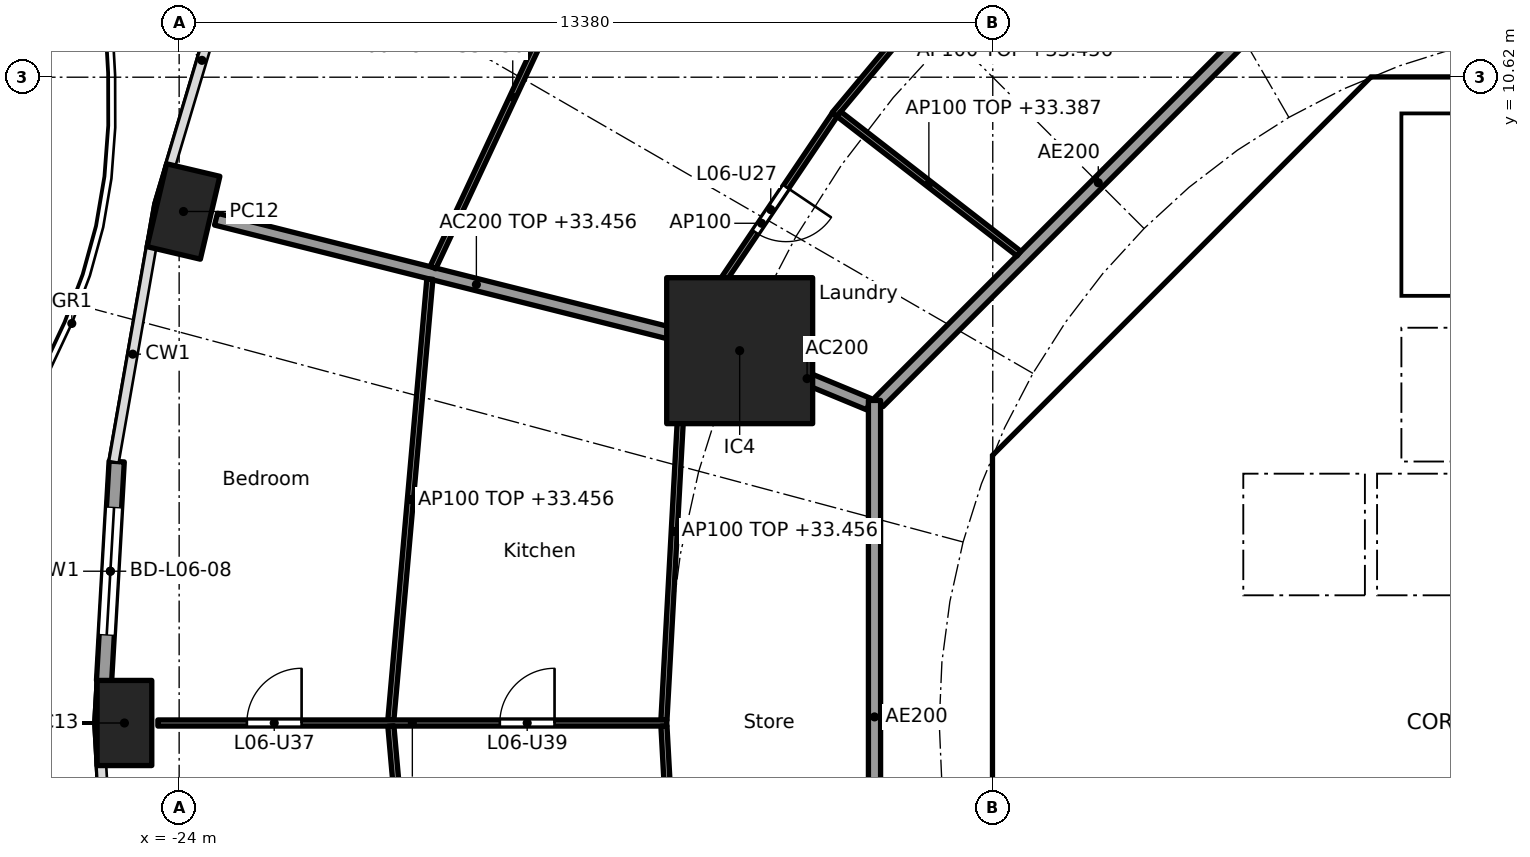
"""IFC4 building model, lengths in metres.
Left out: names, types, materials, properties, quantities, classifications, styles, units other than length and angle.
Written with IfcOpenShell. Run it as: python <this file> out.ifc"""

import sys

from ifc_helpers import new_model, si_unit, direction, frame, frame_2d, origin, origin_2d, place, context, subcontext, project, spatial, polyline, rectangle, hollow_rectangle, outline, extrude, element, fill, save


model = new_model("IFC4")
c1 = context("Model", 3, precision=1e-05, world=origin(), true_north=direction((0.0, 1.0)))
c2 = subcontext(c1, "Body", "Model", "MODEL_VIEW")
j1 = project(units=[si_unit("LENGTHUNIT", "METRE"), si_unit("PLANEANGLEUNIT", "RADIAN")], contexts=[c1])
p1 = place(None, origin())
s1 = spatial("IfcSite", under=j1, at=p1, CompositionType="ELEMENT")
p2 = place(p1, origin())
s2 = spatial("IfcBuilding", under=s1, at=p2, CompositionType="ELEMENT")
p3 = place(p2, frame((0.0, 0.0, 30.7)))
s3 = spatial("IfcBuildingStorey", under=s2, at=p3, CompositionType="ELEMENT", Elevation=30.7)
for number, where, z_axis, x_axis in (
    (1, (-23.929, 8.412, 0.0), (0.0, 0.0, 1.0), (-0.229, -0.973, 0.0)),
    (2, (-24.9, 0.0, 0.0), (0.0, 0.0, 1.0), (0.0, -1.0, 0.0)),
):
    element("IfcColumn", number, at=place(p3, frame(where, z_axis=z_axis, x_axis=x_axis)), inside=s3, PredefinedType="COLUMN", context=c2, shape_type="SweptSolid", body=[
        extrude(hollow_rectangle(XDim=1.4, YDim=0.9, WallThickness=0.05, at=origin_2d()), origin(), (0.0, 0.0, 1.0), 3.7),
    ])
p4 = place(p3, frame((-14.782, 6.123, 0.0), z_axis=(0.0, 0.0, 1.0), x_axis=(1.0, 0.0, 0.0)))
e3 = element("IfcColumn", 3, at=p4, inside=s3, PredefinedType="COLUMN", context=c2, shape_type="SweptSolid", body=[
    extrude(rectangle(XDim=2.4, YDim=2.4, at=origin_2d()), origin(), (0.0, 0.0, 1.0), 3.7),
])
p5 = place(p3, frame((-25.235, 0.692, 0.0), z_axis=(0.0, 0.0, 1.0), x_axis=(0.057478727308, 0.998346731305, 0.0)))
e4 = element("IfcWall", 4, at=p5, inside=s3, PredefinedType="SOLIDWALL", context=c2, shape_type="SweptSolid", body=[
    extrude(rectangle(XDim=3.615, YDim=0.25, at=frame_2d((1.807, 0.0))), origin(), (0.0, 0.0, 1.0), 3.44),
])
p6 = place(p5, frame((0.757, 0.0, 0.0)))
e5 = element("IfcOpeningElement", 5, at=p6, cuts=e4, PredefinedType="OPENING", context=c2, shape_type="SweptSolid", body=[
    extrude(rectangle(XDim=2.1, YDim=2.4, at=frame_2d((1.05, 1.2))), frame((0.0, 0.135, 0.0), z_axis=(0.0, -1.0, 0.0), x_axis=(1.0, 0.0, 0.0)), (0.0, 0.0, 1.0), 0.27),
])
p7 = place(p3, frame((-4.613, 9.988, 0.0), z_axis=(0.0, 0.0, 1.0), x_axis=(-0.707106781187, -0.707106781187, 0.0)))
e6 = element("IfcWall", 6, at=p7, inside=s3, PredefinedType="SHEAR", context=c2, shape_type="SweptSolid", body=[
    extrude(rectangle(XDim=7.602, YDim=0.6, at=frame_2d((3.801, 0.0))), origin(), (0.0, 0.0, 1.0), 3.44),
])
p8 = place(p7, frame((0.351, 0.0, 0.0)))
e7 = element("IfcOpeningElement", 7, at=p8, cuts=e6, PredefinedType="OPENING", context=c2, shape_type="SweptSolid", body=[
    extrude(rectangle(XDim=1.1, YDim=2.1, at=frame_2d((0.55, 1.05))), frame((0.0, 0.31, 0.0), z_axis=(0.0, -1.0, 0.0), x_axis=(1.0, 0.0, 0.0)), (0.0, 0.0, 1.0), 0.62),
])
p9 = place(p3, frame((-10.325, 3.801, 0.0), z_axis=(0.0, 0.0, 1.0), x_axis=(0.0, -1.0, 0.0)))
e8 = element("IfcWall", 8, at=p9, inside=s3, PredefinedType="SHEAR", context=c2, shape_type="SweptSolid", body=[
    extrude(rectangle(XDim=7.602, YDim=0.6, at=frame_2d((3.801, 0.0))), origin(), (0.0, 0.0, 1.0), 3.44),
])
p10 = place(p9, frame((0.651, 0.0, 0.0)))
e9 = element("IfcOpeningElement", 9, at=p10, cuts=e8, PredefinedType="OPENING", context=c2, shape_type="SweptSolid", body=[
    extrude(rectangle(XDim=1.5, YDim=2.1, at=frame_2d((0.75, 1.05))), frame((0.0, 0.31, 0.0), z_axis=(0.0, -1.0, 0.0), x_axis=(1.0, 0.0, 0.0)), (0.0, 0.0, 1.0), 0.62),
])
p11 = place(p9, frame((5.451, 0.0, 0.0)))
e10 = element("IfcOpeningElement", 10, at=p11, cuts=e8, PredefinedType="OPENING", context=c2, shape_type="SweptSolid", body=[
    extrude(rectangle(XDim=1.5, YDim=2.1, at=frame_2d((0.75, 1.05))), frame((0.0, 0.31, 0.0), z_axis=(0.0, -1.0, 0.0), x_axis=(1.0, 0.0, 0.0)), (0.0, 0.0, 1.0), 0.62),
])
p12 = place(p3, frame((-5.8, 4.3, 0.0), z_axis=(0.0, 0.0, 1.0), x_axis=(0.0, 1.0, 0.0)))
e11 = element("IfcWall", 11, at=p12, inside=s3, PredefinedType="PARTITIONING", context=c2, shape_type="SweptSolid", body=[
    extrude(rectangle(XDim=3.927, YDim=0.15, at=frame_2d((1.963, 0.0))), origin(), (0.0, 0.0, 1.0), 3.44),
])
p13 = place(p12, frame((0.413, 0.0, 0.0)))
e12 = element("IfcOpeningElement", 12, at=p13, cuts=e11, PredefinedType="OPENING", context=c2, shape_type="SweptSolid", body=[
    extrude(rectangle(XDim=0.9, YDim=2.1, at=frame_2d((0.45, 1.05))), frame((0.0, 0.085, 0.0), z_axis=(0.0, -1.0, 0.0), x_axis=(1.0, 0.0, 0.0)), (0.0, 0.0, 1.0), 0.17),
])
p14 = place(p12, frame((2.489, 0.0, 0.0)))
e13 = element("IfcOpeningElement", 13, at=p14, cuts=e11, PredefinedType="OPENING", context=c2, shape_type="SweptSolid", body=[
    extrude(rectangle(XDim=0.9, YDim=2.1, at=frame_2d((0.45, 1.05))), frame((0.0, 0.085, 0.0), z_axis=(0.0, -1.0, 0.0), x_axis=(1.0, 0.0, 0.0)), (0.0, 0.0, 1.0), 0.17),
])
p15 = place(p3, frame((-4.0, 4.3, 0.0), z_axis=(0.0, 0.0, 1.0), x_axis=(0.0, 1.0, 0.0)))
e14 = element("IfcWall", 14, at=p15, inside=s3, PredefinedType="SOLIDWALL", context=c2, shape_type="SweptSolid", body=[
    extrude(rectangle(XDim=2.2, YDim=0.2, at=frame_2d((1.1, 0.0))), origin(), (0.0, 0.0, 1.0), 3.44),
])
p16 = place(p15, frame((0.55, 0.0, 0.0)))
e15 = element("IfcOpeningElement", 15, at=p16, cuts=e14, PredefinedType="OPENING", context=c2, shape_type="SweptSolid", body=[
    extrude(rectangle(XDim=1.1, YDim=2.1, at=frame_2d((0.55, 1.05))), frame((0.0, 0.11, 0.0), z_axis=(0.0, -1.0, 0.0), x_axis=(1.0, 0.0, 0.0)), (0.0, 0.0, 1.0), 0.22),
])
p17 = place(p3, frame((-6.7, 2.0, 0.0), z_axis=(0.0, 0.0, 1.0), x_axis=(1.0, 0.0, 0.0)))
e16 = element("IfcWall", 16, at=p17, inside=s3, PredefinedType="SOLIDWALL", context=c2, shape_type="SweptSolid", body=[
    extrude(rectangle(XDim=13.4, YDim=0.2, at=frame_2d((6.7, 0.0))), origin(), (0.0, 0.0, 1.0), 3.44),
])
p18 = place(p17, frame((0.65, 0.0, 0.0)))
e17 = element("IfcOpeningElement", 17, at=p18, cuts=e16, PredefinedType="OPENING", context=c2, shape_type="SweptSolid", body=[
    extrude(rectangle(XDim=1.1, YDim=2.1, at=frame_2d((0.55, 1.05))), frame((0.0, 0.11, 0.0), z_axis=(0.0, -1.0, 0.0), x_axis=(1.0, 0.0, 0.0)), (0.0, 0.0, 1.0), 0.22),
])
p19 = place(p17, frame((2.85, 0.0, 0.0)))
e18 = element("IfcOpeningElement", 18, at=p19, cuts=e16, PredefinedType="OPENING", context=c2, shape_type="SweptSolid", body=[
    extrude(rectangle(XDim=1.1, YDim=2.1, at=frame_2d((0.55, 1.05))), frame((0.0, 0.11, 0.0), z_axis=(0.0, -1.0, 0.0), x_axis=(1.0, 0.0, 0.0)), (0.0, 0.0, 1.0), 0.22),
])
p20 = place(p17, frame((5.05, 0.0, 0.0)))
e19 = element("IfcOpeningElement", 19, at=p20, cuts=e16, PredefinedType="OPENING", context=c2, shape_type="SweptSolid", body=[
    extrude(rectangle(XDim=1.1, YDim=2.1, at=frame_2d((0.55, 1.05))), frame((0.0, 0.11, 0.0), z_axis=(0.0, -1.0, 0.0), x_axis=(1.0, 0.0, 0.0)), (0.0, 0.0, 1.0), 0.22),
])
p21 = place(p3, origin())
e20 = element("IfcWall", 20, at=p21, inside=s3, PredefinedType="SHEAR", context=c2, shape_type="SweptSolid", body=[
    extrude(outline(polyline([(-10.2, 4.825), (-9.776, 4.401), (-10.025, 4.152), (-10.025, 3.801), (-10.625, 3.801), (-10.625, 4.401), (-10.2, 4.825)])), origin(), (0.0, 0.0, 1.0), 3.44),
])
p22 = place(p3, origin())
e21 = element("IfcWall", 21, at=p22, inside=s3, PredefinedType="SHEAR", context=c2, shape_type="SweptSolid", body=[
    extrude(outline(polyline([(-4.152, 10.025), (-4.401, 9.776), (-4.825, 10.2), (-4.401, 10.625), (4.401, 10.625), (4.825, 10.2), (4.401, 9.776), (4.152, 10.025), (-4.152, 10.025)])), origin(), (0.0, 0.0, 1.0), 3.44),
])
p23 = place(p3, frame((-10.025, 4.0, 0.0), z_axis=(0.0, 0.0, 1.0), x_axis=(1.0, 0.0, 0.0)))
e22 = element("IfcWall", 22, at=p23, inside=s3, PredefinedType="PARTITIONING", context=c2, shape_type="SweptSolid", body=[
    extrude(rectangle(XDim=3.325, YDim=0.2, at=frame_2d((1.662, 0.0))), origin(), (0.0, 0.0, 1.0), 3.44),
])
p24 = place(p3, frame((-8.001, 6.1, 0.0), z_axis=(0.0, 0.0, 1.0), x_axis=(1.0, 0.0, 0.0)))
e23 = element("IfcWall", 23, at=p24, inside=s3, PredefinedType="PARTITIONING", context=c2, shape_type="SweptSolid", body=[
    extrude(rectangle(XDim=2.126, YDim=0.15, at=frame_2d((1.063, 0.0))), origin(), (0.0, 0.0, 1.0), 3.44),
])
p25 = place(p3, origin())
e24 = element("IfcWall", 24, at=p25, inside=s3, PredefinedType="SOLIDWALL", context=c2, shape_type="SweptSolid", body=[
    extrude(outline(polyline([(-6.5, 2.1), (-6.7, 2.1), (-6.7, 4.3), (6.7, 4.3), (6.7, 2.1), (6.5, 2.1), (6.5, 4.1), (4.5, 4.1), (4.5, 2.1), (4.3, 2.1), (4.3, 4.1), (2.3, 4.1), (2.3, 2.1), (2.1, 2.1), (2.1, 4.1), (0.1, 4.1), (0.1, 2.1), (-0.1, 2.1), (-0.1, 4.1), (-2.1, 4.1), (-2.1, 2.1), (-2.3, 2.1), (-2.3, 4.1), (-4.3, 4.1), (-4.3, 2.1), (-4.5, 2.1), (-4.5, 4.1), (-6.5, 4.1), (-6.5, 2.1)])), origin(), (0.0, 0.0, 1.0), 3.44),
])
p26 = place(p3, origin())
e25 = element("IfcWall", 25, at=p26, inside=s3, PredefinedType="SOLIDWALL", context=c2, shape_type="SweptSolid", body=[
    extrude(outline(polyline([(-3.9, 7.025), (-4.1, 7.025), (-4.1, 10.025), (-3.9, 10.025), (-3.9, 7.025)])), origin(), (0.0, 0.0, 1.0), 3.44),
])
p27 = place(p3, origin())
e26 = element("IfcWall", 26, at=p27, inside=s3, PredefinedType="SOLIDWALL", context=c2, shape_type="SweptSolid", body=[
    extrude(outline(polyline([(4.1, 6.5), (-4.1, 6.5), (-4.1, 7.025), (4.1, 7.025), (4.1, 6.5)])), origin(), (0.0, 0.0, 1.0), 3.44),
])
p28 = place(p3, frame((-12.657, 5.243, 0.0), z_axis=(0.0, 0.0, 1.0), x_axis=(-0.923885664896, 0.382668627144, 0.0)))
e27 = element("IfcWall", 27, at=p28, inside=s3, PredefinedType="PARTITIONING", context=c2, shape_type="SweptSolid", body=[
    extrude(rectangle(XDim=2.2, YDim=0.2, at=frame_2d((1.1, 0.0))), origin(), (0.0, 0.0, 1.0), 3.44),
])
p29 = place(p3, frame((-14.831, 6.135, 0.0), z_axis=(0.0, 0.0, 1.0), x_axis=(-0.969884949569, 0.243563512454, 0.0)))
e28 = element("IfcWall", 28, at=p29, inside=s3, PredefinedType="PARTITIONING", context=c2, shape_type="SweptSolid", body=[
    extrude(rectangle(XDim=8.829, YDim=0.2, at=frame_2d((4.415, 0.0))), origin(), (0.0, 0.0, 1.0), 2.756),
])
p30 = place(p3, frame((-5.275, 12.494, 0.0), z_axis=(0.0, 0.0, 1.0), x_axis=(-0.707106781187, -0.707106781187, 0.0)))
e29 = element("IfcWall", 29, at=p30, inside=s3, PredefinedType="PARTITIONING", context=c2, shape_type="SweptSolid", body=[
    extrude(rectangle(XDim=10.209, YDim=0.2, at=frame_2d((5.104, 0.0))), origin(), (0.0, 0.0, 1.0), 3.44),
])
p31 = place(p3, frame((-12.565, 5.304, 0.0), z_axis=(0.0, 0.0, 1.0), x_axis=(0.0, -1.0, 0.0)))
e30 = element("IfcWall", 30, at=p31, inside=s3, PredefinedType="PARTITIONING", context=c2, shape_type="SweptSolid", body=[
    extrude(rectangle(XDim=10.409, YDim=0.2, at=frame_2d((5.205, 0.0))), origin(), (0.0, 0.0, 1.0), 3.44),
])
p32 = place(p3, frame((-10.123, 13.72, 0.0), z_axis=(0.0, 0.0, 1.0), x_axis=(-0.64083455704, -0.767679015282, 0.0)))
e31 = element("IfcWall", 31, at=p32, inside=s3, PredefinedType="PARTITIONING", context=c2, shape_type="SweptSolid", body=[
    extrude(rectangle(XDim=4.837, YDim=0.1, at=frame_2d((2.418, 0.0))), origin(), (0.0, 0.0, 1.0), 2.756),
])
p33 = place(p3, frame((-10.19, 7.719, 0.0), z_axis=(0.0, 0.0, 1.0), x_axis=(-0.790253294643, 0.612780327937, 0.0)))
e32 = element("IfcWall", 32, at=p33, inside=s3, PredefinedType="PARTITIONING", context=c2, shape_type="SweptSolid", body=[
    extrude(rectangle(XDim=3.746, YDim=0.1, at=frame_2d((1.873, 0.0))), origin(), (0.0, 0.0, 1.0), 2.687),
])
p34 = place(p3, frame((-13.218, 10.004, 0.0), z_axis=(0.0, 0.0, 1.0), x_axis=(-0.559112679527, -0.829091678641, 0.0)))
e33 = element("IfcWall", 33, at=p34, inside=s3, PredefinedType="PARTITIONING", context=c2, shape_type="SweptSolid", body=[
    extrude(rectangle(XDim=4.308, YDim=0.1, at=frame_2d((2.154, 0.0))), origin(), (0.0, 0.0, 1.0), 3.44),
])
p35 = place(p34, frame((1.433, 0.0, 0.0)))
e34 = element("IfcOpeningElement", 34, at=p35, cuts=e33, PredefinedType="OPENING", context=c2, shape_type="SweptSolid", body=[
    extrude(rectangle(XDim=0.9, YDim=2.1, at=frame_2d((0.45, 1.05))), frame((0.0, 0.06, 0.0), z_axis=(0.0, -1.0, 0.0), x_axis=(1.0, 0.0, 0.0)), (0.0, 0.0, 1.0), 0.12),
])
p36 = place(p3, frame((-17.203, 13.095, 0.0), z_axis=(0.0, 0.0, 1.0), x_axis=(-0.423926333401, -0.905696673202, 0.0)))
e35 = element("IfcWall", 35, at=p36, inside=s3, PredefinedType="PARTITIONING", context=c2, shape_type="SweptSolid", body=[
    extrude(rectangle(XDim=6.188, YDim=0.1, at=frame_2d((3.094, 0.0))), origin(), (0.0, 0.0, 1.0), 2.756),
])
p37 = place(p3, frame((-15.688, 6.249, 0.0), z_axis=(0.0, 0.0, 1.0), x_axis=(-0.054659814056, -0.998505034903, 0.0)))
e36 = element("IfcWall", 36, at=p37, inside=s3, PredefinedType="PARTITIONING", context=c2, shape_type="SweptSolid", body=[
    extrude(rectangle(XDim=6.208, YDim=0.1, at=frame_2d((3.104, 0.0))), origin(), (0.0, 0.0, 1.0), 2.756),
])
p38 = place(p3, frame((-19.877, 7.301, 0.0), z_axis=(0.0, 0.0, 1.0), x_axis=(-0.088143415068, -0.996107794558, 0.0)))
e37 = element("IfcWall", 37, at=p38, inside=s3, PredefinedType="PARTITIONING", context=c2, shape_type="SweptSolid", body=[
    extrude(rectangle(XDim=7.279, YDim=0.1, at=frame_2d((3.64, 0.0))), origin(), (0.0, 0.0, 1.0), 2.756),
])
p39 = place(p3, frame((-15.98, 0.0, 0.0), z_axis=(0.0, 0.0, 1.0), x_axis=(-1.0, 0.0, 0.0)))
e38 = element("IfcWall", 38, at=p39, inside=s3, PredefinedType="PARTITIONING", context=c2, shape_type="SweptSolid", body=[
    extrude(rectangle(XDim=8.37, YDim=0.1, at=frame_2d((4.185, 0.0))), origin(), (0.0, 0.0, 1.0), 2.756),
])
p40 = place(p39, frame((6.006, 0.0, 0.0)))
e39 = element("IfcOpeningElement", 39, at=p40, cuts=e38, PredefinedType="OPENING", context=c2, shape_type="SweptSolid", body=[
    extrude(rectangle(XDim=0.9, YDim=2.1, at=frame_2d((0.45, 1.05))), frame((0.0, 0.06, 0.0), z_axis=(0.0, -1.0, 0.0), x_axis=(1.0, 0.0, 0.0)), (0.0, 0.0, 1.0), 0.12),
])
p41 = place(p39, frame((1.846, 0.0, 0.0)))
e40 = element("IfcOpeningElement", 40, at=p41, cuts=e38, PredefinedType="OPENING", context=c2, shape_type="SweptSolid", body=[
    extrude(rectangle(XDim=0.9, YDim=2.1, at=frame_2d((0.45, 1.05))), frame((0.0, 0.06, 0.0), z_axis=(0.0, -1.0, 0.0), x_axis=(1.0, 0.0, 0.0)), (0.0, 0.0, 1.0), 0.12),
])
p42 = place(p3, frame((-16.028, -0.05, 0.0), z_axis=(0.0, 0.0, 1.0), x_axis=(0.054636410342, -0.998506315786, 0.0)))
e41 = element("IfcWall", 41, at=p42, inside=s3, PredefinedType="PARTITIONING", context=c2, shape_type="SweptSolid", body=[
    extrude(rectangle(XDim=6.359, YDim=0.1, at=frame_2d((3.179, 0.0))), origin(), (0.0, 0.0, 1.0), 2.756),
])
p43 = place(p42, frame((2.704, 0.0, 0.0)))
e42 = element("IfcOpeningElement", 42, at=p43, cuts=e41, PredefinedType="OPENING", context=c2, shape_type="SweptSolid", body=[
    extrude(rectangle(XDim=0.9, YDim=2.1, at=frame_2d((0.45, 1.05))), frame((0.0, 0.06, 0.0), z_axis=(0.0, -1.0, 0.0), x_axis=(1.0, 0.0, 0.0)), (0.0, 0.0, 1.0), 0.12),
])
p44 = place(p3, frame((-20.518, -0.05, 0.0), z_axis=(0.0, 0.0, 1.0), x_axis=(0.088138375539, -0.996108240483, 0.0)))
e43 = element("IfcWall", 43, at=p44, inside=s3, PredefinedType="PARTITIONING", context=c2, shape_type="SweptSolid", body=[
    extrude(rectangle(XDim=7.429, YDim=0.1, at=frame_2d((3.714, 0.0))), origin(), (0.0, 0.0, 1.0), 2.756),
])
p45 = place(p44, frame((3.24, 0.0, 0.0)))
e44 = element("IfcOpeningElement", 44, at=p45, cuts=e43, PredefinedType="OPENING", context=c2, shape_type="SweptSolid", body=[
    extrude(rectangle(XDim=0.9, YDim=2.1, at=frame_2d((0.45, 1.05))), frame((0.0, 0.06, 0.0), z_axis=(0.0, -1.0, 0.0), x_axis=(1.0, 0.0, 0.0)), (0.0, 0.0, 1.0), 0.12),
])
p46 = place(p6, origin())
e45 = element("IfcDoor", 45, at=p46, inside=s3, OperationType="SLIDING_TO_LEFT", PredefinedType="DOOR", context=c2, shape_type="SweptSolid", body=[
    extrude(rectangle(XDim=2.1, YDim=2.4, at=frame_2d((1.05, 1.2))), frame((0.0, 0.025, 0.0), z_axis=(0.0, -1.0, 0.0), x_axis=(1.0, 0.0, 0.0)), (0.0, 0.0, 1.0), 0.05),
])
fill(e5, e45)
p47 = place(p18, origin())
e46 = element("IfcDoor", 46, at=p47, inside=s3, OperationType="DOUBLE_DOOR_SLIDING", PredefinedType="DOOR", context=c2, shape_type="SweptSolid", body=[
    extrude(rectangle(XDim=1.1, YDim=2.1, at=frame_2d((0.55, 1.05))), frame((0.0, 0.025, 0.0), z_axis=(0.0, -1.0, 0.0), x_axis=(1.0, 0.0, 0.0)), (0.0, 0.0, 1.0), 0.05),
])
fill(e17, e46)
p48 = place(p19, origin())
e47 = element("IfcDoor", 47, at=p48, inside=s3, OperationType="DOUBLE_DOOR_SLIDING", PredefinedType="DOOR", context=c2, shape_type="SweptSolid", body=[
    extrude(rectangle(XDim=1.1, YDim=2.1, at=frame_2d((0.55, 1.05))), frame((0.0, 0.025, 0.0), z_axis=(0.0, -1.0, 0.0), x_axis=(1.0, 0.0, 0.0)), (0.0, 0.0, 1.0), 0.05),
])
fill(e18, e47)
p49 = place(p16, origin())
e48 = element("IfcDoor", 48, at=p49, inside=s3, OperationType="DOUBLE_DOOR_SLIDING", PredefinedType="DOOR", context=c2, shape_type="SweptSolid", body=[
    extrude(rectangle(XDim=1.1, YDim=2.1, at=frame_2d((0.55, 1.05))), frame((0.0, 0.025, 0.0), z_axis=(0.0, -1.0, 0.0), x_axis=(1.0, 0.0, 0.0)), (0.0, 0.0, 1.0), 0.05),
])
fill(e15, e48)
p50 = place(p13, origin())
e49 = element("IfcDoor", 49, at=p50, inside=s3, OperationType="SINGLE_SWING_LEFT", PredefinedType="DOOR", context=c2, shape_type="SweptSolid", body=[
    extrude(rectangle(XDim=0.9, YDim=2.1, at=frame_2d((0.45, 1.05))), frame((0.0, 0.025, 0.0), z_axis=(0.0, -1.0, 0.0), x_axis=(1.0, 0.0, 0.0)), (0.0, 0.0, 1.0), 0.05),
])
fill(e12, e49)
p51 = place(p14, origin())
e50 = element("IfcDoor", 50, at=p51, inside=s3, OperationType="SINGLE_SWING_LEFT", PredefinedType="DOOR", context=c2, shape_type="SweptSolid", body=[
    extrude(rectangle(XDim=0.9, YDim=2.1, at=frame_2d((0.45, 1.05))), frame((0.0, 0.025, 0.0), z_axis=(0.0, -1.0, 0.0), x_axis=(1.0, 0.0, 0.0)), (0.0, 0.0, 1.0), 0.05),
])
fill(e13, e50)
p52 = place(p10, origin())
e51 = element("IfcDoor", 51, at=p52, inside=s3, OperationType="DOUBLE_DOOR_SINGLE_SWING", PredefinedType="DOOR", context=c2, shape_type="SweptSolid", body=[
    extrude(rectangle(XDim=1.5, YDim=2.1, at=frame_2d((0.75, 1.05))), frame((0.0, 0.025, 0.0), z_axis=(0.0, -1.0, 0.0), x_axis=(1.0, 0.0, 0.0)), (0.0, 0.0, 1.0), 0.05),
])
fill(e9, e51)
p53 = place(p8, origin())
e52 = element("IfcDoor", 52, at=p53, inside=s3, OperationType="SINGLE_SWING_RIGHT", PredefinedType="DOOR", context=c2, shape_type="SweptSolid", body=[
    extrude(rectangle(XDim=1.1, YDim=2.1, at=frame_2d((0.55, 1.05))), frame((0.0, 0.025, 0.0), z_axis=(0.0, -1.0, 0.0), x_axis=(1.0, 0.0, 0.0)), (0.0, 0.0, 1.0), 0.05),
])
fill(e7, e52)
p54 = place(p35, origin())
e53 = element("IfcDoor", 53, at=p54, inside=s3, OperationType="SINGLE_SWING_LEFT", PredefinedType="DOOR", context=c2, shape_type="SweptSolid", body=[
    extrude(rectangle(XDim=0.9, YDim=2.1, at=frame_2d((0.45, 1.05))), frame((0.0, 0.025, 0.0), z_axis=(0.0, -1.0, 0.0), x_axis=(1.0, 0.0, 0.0)), (0.0, 0.0, 1.0), 0.05),
])
fill(e34, e53)
p55 = place(p40, frame((0.9, 0.0, 0.0), x_axis=(-1.0, 0.0, 0.0)))
e54 = element("IfcDoor", 54, at=p55, inside=s3, OperationType="SINGLE_SWING_RIGHT", PredefinedType="DOOR", context=c2, shape_type="SweptSolid", body=[
    extrude(rectangle(XDim=0.9, YDim=2.1, at=frame_2d((0.45, 1.05))), frame((0.0, 0.025, 0.0), z_axis=(0.0, -1.0, 0.0), x_axis=(1.0, 0.0, 0.0)), (0.0, 0.0, 1.0), 0.05),
])
fill(e39, e54)
p56 = place(p41, frame((0.9, 0.0, 0.0), x_axis=(-1.0, 0.0, 0.0)))
e55 = element("IfcDoor", 55, at=p56, inside=s3, OperationType="SINGLE_SWING_RIGHT", PredefinedType="DOOR", context=c2, shape_type="SweptSolid", body=[
    extrude(rectangle(XDim=0.9, YDim=2.1, at=frame_2d((0.45, 1.05))), frame((0.0, 0.025, 0.0), z_axis=(0.0, -1.0, 0.0), x_axis=(1.0, 0.0, 0.0)), (0.0, 0.0, 1.0), 0.05),
])
fill(e40, e55)
save(model, sys.argv[1])
